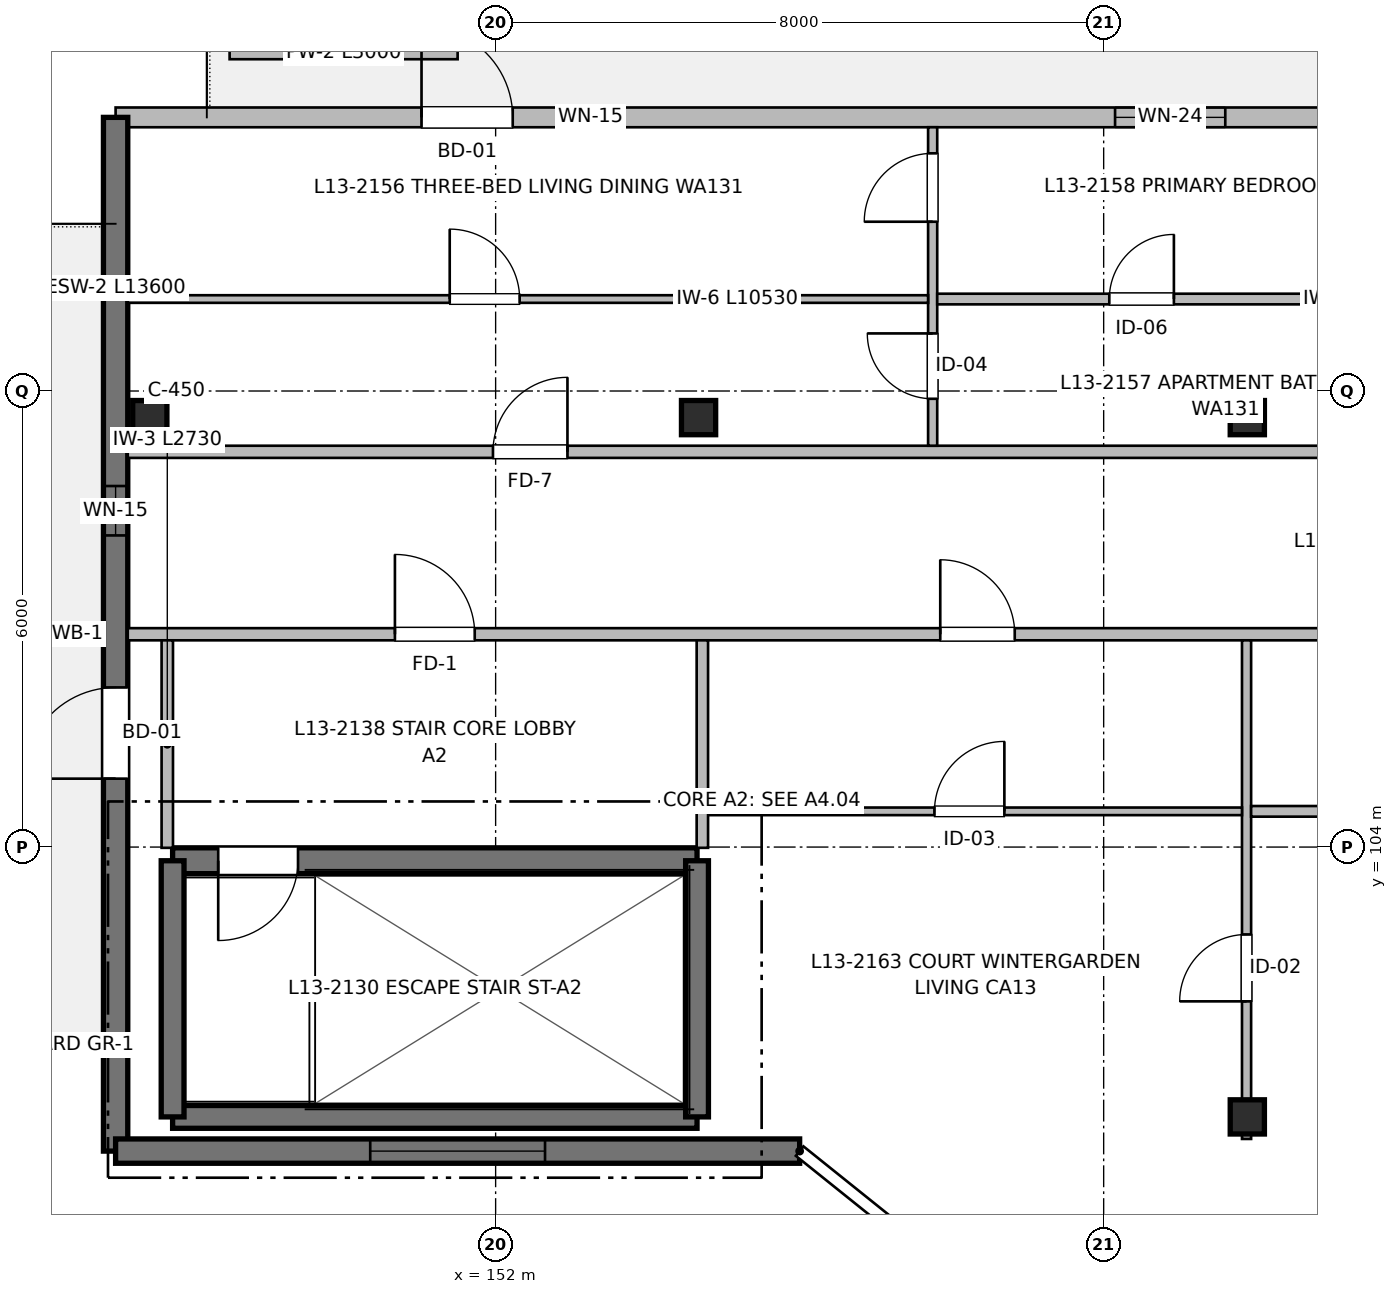
"""IFC4 building model, lengths in metres.
Left out: names, types, materials, properties, quantities, classifications, styles, units other than length and angle.
Written with IfcOpenShell. Run it as: python <this file> out.ifc"""

import sys

from ifc_helpers import new_model, si_unit, direction, frame, frame_2d, origin, origin_2d, place, context, subcontext, project, spatial, rectangle, extrude, element, fill, save


model = new_model("IFC4")
c1 = context("Model", 3, precision=1e-05, world=origin(), true_north=direction((0.0, 1.0)))
c2 = subcontext(c1, "Body", "Model", "MODEL_VIEW")
j1 = project(units=[si_unit("LENGTHUNIT", "METRE"), si_unit("PLANEANGLEUNIT", "RADIAN")], contexts=[c1])
p1 = place(None, origin())
s1 = spatial("IfcSite", under=j1, at=p1, CompositionType="ELEMENT")
p2 = place(p1, origin())
s2 = spatial("IfcBuilding", under=s1, at=p2, CompositionType="ELEMENT")
p3 = place(p2, frame((0.0, 0.0, 42.56)))
s3 = spatial("IfcBuildingStorey", under=s2, at=p3, CompositionType="ELEMENT", Elevation=42.56)
for number, where, z_axis, x_axis in (
    (1, (147.45, 109.65, 0.0), (0.0, 0.0, 1.0), (1.0, 0.0, 0.0)),
    (2, (154.67, 109.65, 0.0), (0.0, 0.0, 1.0), (1.0, 0.0, 0.0)),
    (3, (161.89, 100.45, 0.0), (0.0, 0.0, 1.0), (1.0, 0.0, 0.0)),
    (4, (161.89, 109.65, 0.0), (0.0, 0.0, 1.0), (1.0, 0.0, 0.0)),
):
    element("IfcColumn", number, at=place(p3, frame(where, z_axis=z_axis, x_axis=x_axis)), inside=s3, PredefinedType="COLUMN", context=c2, shape_type="SweptSolid", body=[
        extrude(rectangle(XDim=0.45, YDim=0.45, at=origin_2d()), origin(), (0.0, 0.0, 1.0), 3.2),
    ])
p4 = place(p3, frame((147.75, 100.45, 0.0), z_axis=(0.0, 0.0, 1.0), x_axis=(1.0, 0.0, 0.0)))
e5 = element("IfcWall", 5, at=p4, inside=s3, PredefinedType="SHEAR", context=c2, shape_type="SweptSolid", body=[
    extrude(rectangle(XDim=6.9, YDim=0.3, at=frame_2d((3.45, 0.0))), origin(), (0.0, 0.0, 1.0), 3.2),
])
p5 = place(p3, frame((154.65, 103.82, 0.0), z_axis=(0.0, 0.0, 1.0), x_axis=(-1.0, 0.0, 0.0)))
e6 = element("IfcWall", 6, at=p5, inside=s3, PredefinedType="SHEAR", context=c2, shape_type="SweptSolid", body=[
    extrude(rectangle(XDim=6.9, YDim=0.34, at=frame_2d((3.45, 0.0))), origin(), (0.0, 0.0, 1.0), 3.2),
])
p6 = place(p5, frame((5.25, 0.0, 0.0)))
e7 = element("IfcOpeningElement", 7, at=p6, cuts=e6, PredefinedType="OPENING", context=c2, shape_type="SweptSolid", body=[
    extrude(rectangle(XDim=1.05, YDim=2.15, at=frame_2d((0.525, 1.075))), frame((0.0, 0.18, 0.0), z_axis=(0.0, -1.0, 0.0), x_axis=(1.0, 0.0, 0.0)), (0.0, 0.0, 1.0), 0.36),
])
for number, where, z_axis, x_axis in (
    (8, (147.75, 103.82, 0.0), (0.0, 0.0, 1.0), (0.0, -1.0, 0.0)),
    (9, (154.65, 100.45, 0.0), (0.0, 0.0, 1.0), (0.0, 1.0, 0.0)),
):
    element("IfcWall", number, at=place(p3, frame(where, z_axis=z_axis, x_axis=x_axis)), inside=s3, PredefinedType="SHEAR", context=c2, shape_type="SweptSolid", body=[
        extrude(rectangle(XDim=3.37, YDim=0.3, at=frame_2d((1.685, 0.0))), origin(), (0.0, 0.0, 1.0), 3.2),
    ])
p7 = place(p3, frame((147.0, 113.6, 0.0), z_axis=(0.0, 0.0, 1.0), x_axis=(1.0, 0.0, 0.0)))
e10 = element("IfcWall", 10, at=p7, inside=s3, PredefinedType="SOLIDWALL", context=c2, shape_type="SweptSolid", body=[
    extrude(rectangle(XDim=37.0, YDim=0.26, at=frame_2d((18.5, 0.0))), origin(), (0.0, 0.0, 1.0), 2.98),
])
p8 = place(p7, frame((4.025, 0.0, 0.0)))
e11 = element("IfcOpeningElement", 11, at=p8, cuts=e10, PredefinedType="OPENING", context=c2, shape_type="SweptSolid", body=[
    extrude(rectangle(XDim=1.2, YDim=2.2, at=frame_2d((0.6, 1.1))), frame((0.0, 0.14, 0.0), z_axis=(0.0, -1.0, 0.0), x_axis=(1.0, 0.0, 0.0)), (0.0, 0.0, 1.0), 0.28),
])
p9 = place(p7, frame((5.925, 0.0, 0.9)))
e12 = element("IfcOpeningElement", 12, at=p9, cuts=e10, PredefinedType="OPENING", context=c2, shape_type="SweptSolid", body=[
    extrude(rectangle(XDim=0.65, YDim=0.95, at=frame_2d((0.325, 0.475))), frame((0.0, 0.14, 0.0), z_axis=(0.0, -1.0, 0.0), x_axis=(1.0, 0.0, 0.0)), (0.0, 0.0, 1.0), 0.28),
])
p10 = place(p7, frame((13.15, 0.0, 0.77)))
e13 = element("IfcOpeningElement", 13, at=p10, cuts=e10, PredefinedType="OPENING", context=c2, shape_type="SweptSolid", body=[
    extrude(rectangle(XDim=1.45, YDim=1.45, at=frame_2d((0.725, 0.725))), frame((0.0, 0.14, 0.0), z_axis=(0.0, -1.0, 0.0), x_axis=(1.0, 0.0, 0.0)), (0.0, 0.0, 1.0), 0.28),
])
p11 = place(p7, frame((22.525, 0.0, 0.0)))
e14 = element("IfcOpeningElement", 14, at=p11, cuts=e10, PredefinedType="OPENING", context=c2, shape_type="SweptSolid", body=[
    extrude(rectangle(XDim=1.2, YDim=2.2, at=frame_2d((0.6, 1.1))), frame((0.0, 0.14, 0.0), z_axis=(0.0, -1.0, 0.0), x_axis=(1.0, 0.0, 0.0)), (0.0, 0.0, 1.0), 0.28),
])
p12 = place(p7, frame((24.425, 0.0, 0.47)))
e15 = element("IfcOpeningElement", 15, at=p12, cuts=e10, PredefinedType="OPENING", context=c2, shape_type="SweptSolid", body=[
    extrude(rectangle(XDim=2.7, YDim=1.75, at=frame_2d((1.35, 0.875))), frame((0.0, 0.14, 0.0), z_axis=(0.0, -1.0, 0.0), x_axis=(1.0, 0.0, 0.0)), (0.0, 0.0, 1.0), 0.28),
])
p13 = place(p7, frame((31.075, 0.0, 0.67)))
e16 = element("IfcOpeningElement", 16, at=p13, cuts=e10, PredefinedType="OPENING", context=c2, shape_type="SweptSolid", body=[
    extrude(rectangle(XDim=2.6, YDim=1.55, at=frame_2d((1.3, 0.775))), frame((0.0, 0.14, 0.0), z_axis=(0.0, -1.0, 0.0), x_axis=(1.0, 0.0, 0.0)), (0.0, 0.0, 1.0), 0.28),
])
p14 = place(p3, frame((147.0, 100.0, 0.0), z_axis=(0.0, 0.0, 1.0), x_axis=(0.0, 1.0, 0.0)))
e17 = element("IfcWall", 17, at=p14, inside=s3, PredefinedType="SHEAR", context=c2, shape_type="SweptSolid", body=[
    extrude(rectangle(XDim=13.6, YDim=0.32, at=frame_2d((6.8, 0.0))), origin(), (0.0, 0.0, 1.0), 2.98),
])
p15 = place(p14, frame((4.9, 0.0, 0.0)))
e18 = element("IfcOpeningElement", 18, at=p15, cuts=e17, PredefinedType="OPENING", context=c2, shape_type="SweptSolid", body=[
    extrude(rectangle(XDim=1.2, YDim=2.2, at=frame_2d((0.6, 1.1))), frame((0.0, 0.17, 0.0), z_axis=(0.0, -1.0, 0.0), x_axis=(1.0, 0.0, 0.0)), (0.0, 0.0, 1.0), 0.34),
])
p16 = place(p14, frame((8.1, 0.0, 0.9)))
e19 = element("IfcOpeningElement", 19, at=p16, cuts=e17, PredefinedType="OPENING", context=c2, shape_type="SweptSolid", body=[
    extrude(rectangle(XDim=0.65, YDim=0.95, at=frame_2d((0.325, 0.475))), frame((0.0, 0.17, 0.0), z_axis=(0.0, -1.0, 0.0), x_axis=(1.0, 0.0, 0.0)), (0.0, 0.0, 1.0), 0.34),
])
p17 = place(p3, frame((156.0, 100.0, 0.0), z_axis=(0.0, 0.0, 1.0), x_axis=(-1.0, 0.0, 0.0)))
e20 = element("IfcWall", 20, at=p17, inside=s3, PredefinedType="SHEAR", context=c2, shape_type="SweptSolid", body=[
    extrude(rectangle(XDim=9.0, YDim=0.32, at=frame_2d((4.5, 0.0))), origin(), (0.0, 0.0, 1.0), 2.98),
])
p18 = place(p17, frame((3.35, 0.0, 0.57)))
e21 = element("IfcOpeningElement", 21, at=p18, cuts=e20, PredefinedType="OPENING", context=c2, shape_type="SweptSolid", body=[
    extrude(rectangle(XDim=2.3, YDim=1.65, at=frame_2d((1.15, 0.825))), frame((0.0, 0.17, 0.0), z_axis=(0.0, -1.0, 0.0), x_axis=(1.0, 0.0, 0.0)), (0.0, 0.0, 1.0), 0.34),
])
p19 = place(p3, frame((148.5, 114.45, 0.0), z_axis=(0.0, 0.0, 1.0), x_axis=(1.0, 0.0, 0.0)))
e22 = element("IfcWall", 22, at=p19, inside=s3, PredefinedType="PARAPET", context=c2, shape_type="SweptSolid", body=[
    extrude(rectangle(XDim=3.0, YDim=0.17, at=frame_2d((1.5, 0.0))), origin(), (0.0, 0.0, 1.0), 0.45),
])
p20 = place(p3, frame((147.16, 106.8, 0.0), z_axis=(0.0, 0.0, 1.0), x_axis=(1.0, 0.0, 0.0)))
e23 = element("IfcWall", 23, at=p20, inside=s3, PredefinedType="PARTITIONING", context=c2, shape_type="SweptSolid", body=[
    extrude(rectangle(XDim=27.64, YDim=0.16, at=frame_2d((13.82, 0.0))), origin(), (0.0, 0.0, 1.0), 2.935),
])
p21 = place(p20, frame((3.515, 0.0, 0.0)))
e24 = element("IfcOpeningElement", 24, at=p21, cuts=e23, PredefinedType="OPENING", context=c2, shape_type="SweptSolid", body=[
    extrude(rectangle(XDim=1.05, YDim=2.15, at=frame_2d((0.525, 1.075))), frame((0.0, 0.09, 0.0), z_axis=(0.0, -1.0, 0.0), x_axis=(1.0, 0.0, 0.0)), (0.0, 0.0, 1.0), 0.18),
])
p22 = place(p20, frame((10.69, 0.0, 0.0)))
e25 = element("IfcOpeningElement", 25, at=p22, cuts=e23, PredefinedType="OPENING", context=c2, shape_type="SweptSolid", body=[
    extrude(rectangle(XDim=0.98, YDim=2.15, at=frame_2d((0.49, 1.075))), frame((0.0, 0.09, 0.0), z_axis=(0.0, -1.0, 0.0), x_axis=(1.0, 0.0, 0.0)), (0.0, 0.0, 1.0), 0.18),
])
p23 = place(p3, frame((147.16, 109.2, 0.0), z_axis=(0.0, 0.0, 1.0), x_axis=(1.0, 0.0, 0.0)))
e26 = element("IfcWall", 26, at=p23, inside=s3, PredefinedType="PARTITIONING", context=c2, shape_type="SweptSolid", body=[
    extrude(rectangle(XDim=36.68, YDim=0.16, at=frame_2d((18.34, 0.0))), origin(), (0.0, 0.0, 1.0), 2.935),
])
p24 = place(p23, frame((4.805, 0.0, 0.0)))
e27 = element("IfcOpeningElement", 27, at=p24, cuts=e26, PredefinedType="OPENING", context=c2, shape_type="SweptSolid", body=[
    extrude(rectangle(XDim=0.98, YDim=2.15, at=frame_2d((0.49, 1.075))), frame((0.0, 0.09, 0.0), z_axis=(0.0, -1.0, 0.0), x_axis=(1.0, 0.0, 0.0)), (0.0, 0.0, 1.0), 0.18),
])
p25 = place(p23, frame((23.235, 0.0, 0.0)))
e28 = element("IfcOpeningElement", 28, at=p25, cuts=e26, PredefinedType="OPENING", context=c2, shape_type="SweptSolid", body=[
    extrude(rectangle(XDim=0.98, YDim=2.15, at=frame_2d((0.49, 1.075))), frame((0.0, 0.09, 0.0), z_axis=(0.0, -1.0, 0.0), x_axis=(1.0, 0.0, 0.0)), (0.0, 0.0, 1.0), 0.18),
])
for number, where, z_axis, x_axis in (
    (29, (147.68, 103.99, 0.0), (0.0, 0.0, 1.0), (0.0, 1.0, 0.0)),
    (30, (154.72, 103.99, 0.0), (0.0, 0.0, 1.0), (0.0, 1.0, 0.0)),
):
    element("IfcWall", number, at=place(p3, frame(where, z_axis=z_axis, x_axis=x_axis)), inside=s3, PredefinedType="PARTITIONING", context=c2, shape_type="SweptSolid", body=[
        extrude(rectangle(XDim=2.73, YDim=0.15, at=frame_2d((1.365, 0.0))), origin(), (0.0, 0.0, 1.0), 2.935),
    ])
p26 = place(p3, frame((157.75, 109.28, 0.0), z_axis=(0.0, 0.0, 1.0), x_axis=(0.0, 1.0, 0.0)))
e31 = element("IfcWall", 31, at=p26, inside=s3, PredefinedType="PARTITIONING", context=c2, shape_type="SweptSolid", body=[
    extrude(rectangle(XDim=4.19, YDim=0.12, at=frame_2d((2.095, 0.0))), origin(), (0.0, 0.0, 1.0), 2.935),
])
p27 = place(p26, frame((0.618, 0.0, 0.0)))
e32 = element("IfcOpeningElement", 32, at=p27, cuts=e31, PredefinedType="OPENING", context=c2, shape_type="SweptSolid", body=[
    extrude(rectangle(XDim=0.86, YDim=2.1, at=frame_2d((0.43, 1.05))), frame((0.0, 0.07, 0.0), z_axis=(0.0, -1.0, 0.0), x_axis=(1.0, 0.0, 0.0)), (0.0, 0.0, 1.0), 0.14),
])
p28 = place(p26, frame((2.947, 0.0, 0.0)))
e33 = element("IfcOpeningElement", 33, at=p28, cuts=e31, PredefinedType="OPENING", context=c2, shape_type="SweptSolid", body=[
    extrude(rectangle(XDim=0.9, YDim=2.1, at=frame_2d((0.45, 1.05))), frame((0.0, 0.07, 0.0), z_axis=(0.0, -1.0, 0.0), x_axis=(1.0, 0.0, 0.0)), (0.0, 0.0, 1.0), 0.14),
])
p29 = place(p3, frame((157.81, 111.21, 0.0), z_axis=(0.0, 0.0, 1.0), x_axis=(1.0, 0.0, 0.0)))
e34 = element("IfcWall", 34, at=p29, inside=s3, PredefinedType="PARTITIONING", context=c2, shape_type="SweptSolid", body=[
    extrude(rectangle(XDim=7.6, YDim=0.14, at=frame_2d((3.8, 0.0))), origin(), (0.0, 0.0, 1.0), 2.935),
])
p30 = place(p29, frame((2.264, 0.0, 0.0)))
e35 = element("IfcOpeningElement", 35, at=p30, cuts=e34, PredefinedType="OPENING", context=c2, shape_type="SweptSolid", body=[
    extrude(rectangle(XDim=0.85, YDim=2.05, at=frame_2d((0.425, 1.025))), frame((0.0, 0.08, 0.0), z_axis=(0.0, -1.0, 0.0), x_axis=(1.0, 0.0, 0.0)), (0.0, 0.0, 1.0), 0.16),
])
p31 = place(p3, frame((147.16, 111.21, 0.0), z_axis=(0.0, 0.0, 1.0), x_axis=(1.0, 0.0, 0.0)))
e36 = element("IfcWall", 36, at=p31, inside=s3, PredefinedType="PARTITIONING", context=c2, shape_type="SweptSolid", body=[
    extrude(rectangle(XDim=10.53, YDim=0.1, at=frame_2d((5.265, 0.0))), origin(), (0.0, 0.0, 1.0), 2.935),
])
p32 = place(p31, frame((4.236, 0.0, 0.0)))
e37 = element("IfcOpeningElement", 37, at=p32, cuts=e36, PredefinedType="OPENING", context=c2, shape_type="SweptSolid", body=[
    extrude(rectangle(XDim=0.92, YDim=2.1, at=frame_2d((0.46, 1.05))), frame((0.0, 0.06, 0.0), z_axis=(0.0, -1.0, 0.0), x_axis=(1.0, 0.0, 0.0)), (0.0, 0.0, 1.0), 0.12),
])
p33 = place(p3, frame((161.88, 100.16, 0.0), z_axis=(0.0, 0.0, 1.0), x_axis=(0.0, 1.0, 0.0)))
e38 = element("IfcWall", 38, at=p33, inside=s3, PredefinedType="PARTITIONING", context=c2, shape_type="SweptSolid", body=[
    extrude(rectangle(XDim=6.56, YDim=0.12, at=frame_2d((3.28, 0.0))), origin(), (0.0, 0.0, 1.0), 2.68),
])
p34 = place(p33, frame((1.81, 0.0, 0.0)))
e39 = element("IfcOpeningElement", 39, at=p34, cuts=e38, PredefinedType="OPENING", context=c2, shape_type="SweptSolid", body=[
    extrude(rectangle(XDim=0.88, YDim=2.1, at=frame_2d((0.44, 1.05))), frame((0.0, 0.07, 0.0), z_axis=(0.0, -1.0, 0.0), x_axis=(1.0, 0.0, 0.0)), (0.0, 0.0, 1.0), 0.14),
])
p35 = place(p3, frame((161.94, 104.47, 0.0), z_axis=(0.0, 0.0, 1.0), x_axis=(1.0, 0.0, 0.0)))
e40 = element("IfcWall", 40, at=p35, inside=s3, PredefinedType="PARTITIONING", context=c2, shape_type="SweptSolid", body=[
    extrude(rectangle(XDim=5.97, YDim=0.14, at=frame_2d((2.985, 0.0))), origin(), (0.0, 0.0, 1.0), 2.935),
])
p36 = place(p35, frame((2.533, 0.0, 0.0)))
e41 = element("IfcOpeningElement", 41, at=p36, cuts=e40, PredefinedType="OPENING", context=c2, shape_type="SweptSolid", body=[
    extrude(rectangle(XDim=0.86, YDim=2.1, at=frame_2d((0.43, 1.05))), frame((0.0, 0.08, 0.0), z_axis=(0.0, -1.0, 0.0), x_axis=(1.0, 0.0, 0.0)), (0.0, 0.0, 1.0), 0.16),
])
p37 = place(p3, frame((154.8, 104.47, 0.0), z_axis=(0.0, 0.0, 1.0), x_axis=(1.0, 0.0, 0.0)))
e42 = element("IfcWall", 42, at=p37, inside=s3, PredefinedType="PARTITIONING", context=c2, shape_type="SweptSolid", body=[
    extrude(rectangle(XDim=7.02, YDim=0.1, at=frame_2d((3.51, 0.0))), origin(), (0.0, 0.0, 1.0), 2.935),
])
p38 = place(p37, frame((2.974, 0.0, 0.0)))
e43 = element("IfcOpeningElement", 43, at=p38, cuts=e42, PredefinedType="OPENING", context=c2, shape_type="SweptSolid", body=[
    extrude(rectangle(XDim=0.92, YDim=2.1, at=frame_2d((0.46, 1.05))), frame((0.0, 0.06, 0.0), z_axis=(0.0, -1.0, 0.0), x_axis=(1.0, 0.0, 0.0)), (0.0, 0.0, 1.0), 0.12),
])
p39 = place(p6, origin())
e44 = element("IfcDoor", 44, at=p39, inside=s3, OperationType="SINGLE_SWING_RIGHT", PredefinedType="DOOR", context=c2, shape_type="SweptSolid", body=[
    extrude(rectangle(XDim=1.05, YDim=2.15, at=frame_2d((0.525, 1.075))), frame((0.0, 0.025, 0.0), z_axis=(0.0, -1.0, 0.0), x_axis=(1.0, 0.0, 0.0)), (0.0, 0.0, 1.0), 0.05),
])
fill(e7, e44)
p40 = place(p8, origin())
e45 = element("IfcDoor", 45, at=p40, inside=s3, OperationType="SINGLE_SWING_LEFT", PredefinedType="DOOR", context=c2, shape_type="SweptSolid", body=[
    extrude(rectangle(XDim=1.2, YDim=2.2, at=frame_2d((0.6, 1.1))), frame((0.0, 0.025, 0.0), z_axis=(0.0, -1.0, 0.0), x_axis=(1.0, 0.0, 0.0)), (0.0, 0.0, 1.0), 0.05),
])
fill(e11, e45)
p41 = place(p9, origin())
e46 = element("IfcWindow", 46, at=p41, inside=s3, PartitioningType="SINGLE_PANEL", PredefinedType="WINDOW", context=c2, shape_type="SweptSolid", body=[
    extrude(rectangle(XDim=0.65, YDim=0.95, at=frame_2d((0.325, 0.475))), frame((0.0, 0.03, 0.0), z_axis=(0.0, -1.0, 0.0), x_axis=(1.0, 0.0, 0.0)), (0.0, 0.0, 1.0), 0.06),
])
fill(e12, e46)
p42 = place(p10, origin())
e47 = element("IfcWindow", 47, at=p42, inside=s3, PartitioningType="SINGLE_PANEL", PredefinedType="WINDOW", context=c2, shape_type="SweptSolid", body=[
    extrude(rectangle(XDim=1.45, YDim=1.45, at=frame_2d((0.725, 0.725))), frame((0.0, 0.03, 0.0), z_axis=(0.0, -1.0, 0.0), x_axis=(1.0, 0.0, 0.0)), (0.0, 0.0, 1.0), 0.06),
])
fill(e13, e47)
p43 = place(p15, origin())
e48 = element("IfcDoor", 48, at=p43, inside=s3, OperationType="SINGLE_SWING_LEFT", PredefinedType="DOOR", context=c2, shape_type="SweptSolid", body=[
    extrude(rectangle(XDim=1.2, YDim=2.2, at=frame_2d((0.6, 1.1))), frame((0.0, 0.025, 0.0), z_axis=(0.0, -1.0, 0.0), x_axis=(1.0, 0.0, 0.0)), (0.0, 0.0, 1.0), 0.05),
])
fill(e18, e48)
p44 = place(p16, origin())
e49 = element("IfcWindow", 49, at=p44, inside=s3, PartitioningType="SINGLE_PANEL", PredefinedType="WINDOW", context=c2, shape_type="SweptSolid", body=[
    extrude(rectangle(XDim=0.65, YDim=0.95, at=frame_2d((0.325, 0.475))), frame((0.0, 0.03, 0.0), z_axis=(0.0, -1.0, 0.0), x_axis=(1.0, 0.0, 0.0)), (0.0, 0.0, 1.0), 0.06),
])
fill(e19, e49)
p45 = place(p18, origin())
e50 = element("IfcWindow", 50, at=p45, inside=s3, PartitioningType="SINGLE_PANEL", PredefinedType="WINDOW", context=c2, shape_type="SweptSolid", body=[
    extrude(rectangle(XDim=2.3, YDim=1.65, at=frame_2d((1.15, 0.825))), frame((0.0, 0.03, 0.0), z_axis=(0.0, -1.0, 0.0), x_axis=(1.0, 0.0, 0.0)), (0.0, 0.0, 1.0), 0.06),
])
fill(e21, e50)
p46 = place(p21, origin())
e51 = element("IfcDoor", 51, at=p46, inside=s3, OperationType="SINGLE_SWING_LEFT", PredefinedType="DOOR", context=c2, shape_type="SweptSolid", body=[
    extrude(rectangle(XDim=1.05, YDim=2.15, at=frame_2d((0.525, 1.075))), frame((0.0, 0.025, 0.0), z_axis=(0.0, -1.0, 0.0), x_axis=(1.0, 0.0, 0.0)), (0.0, 0.0, 1.0), 0.05),
])
fill(e24, e51)
p47 = place(p24, origin())
e52 = element("IfcDoor", 52, at=p47, inside=s3, OperationType="SINGLE_SWING_RIGHT", PredefinedType="DOOR", context=c2, shape_type="SweptSolid", body=[
    extrude(rectangle(XDim=0.98, YDim=2.15, at=frame_2d((0.49, 1.075))), frame((0.0, 0.025, 0.0), z_axis=(0.0, -1.0, 0.0), x_axis=(1.0, 0.0, 0.0)), (0.0, 0.0, 1.0), 0.05),
])
fill(e27, e52)
p48 = place(p32, origin())
e53 = element("IfcDoor", 53, at=p48, inside=s3, OperationType="SINGLE_SWING_LEFT", PredefinedType="DOOR", context=c2, shape_type="SweptSolid", body=[
    extrude(rectangle(XDim=0.92, YDim=2.1, at=frame_2d((0.46, 1.05))), frame((0.0, 0.025, 0.0), z_axis=(0.0, -1.0, 0.0), x_axis=(1.0, 0.0, 0.0)), (0.0, 0.0, 1.0), 0.05),
])
fill(e37, e53)
p49 = place(p27, origin())
e54 = element("IfcDoor", 54, at=p49, inside=s3, OperationType="SINGLE_SWING_RIGHT", PredefinedType="DOOR", context=c2, shape_type="SweptSolid", body=[
    extrude(rectangle(XDim=0.86, YDim=2.1, at=frame_2d((0.43, 1.05))), frame((0.0, 0.025, 0.0), z_axis=(0.0, -1.0, 0.0), x_axis=(1.0, 0.0, 0.0)), (0.0, 0.0, 1.0), 0.05),
])
fill(e32, e54)
p50 = place(p28, origin())
e55 = element("IfcDoor", 55, at=p50, inside=s3, OperationType="SINGLE_SWING_LEFT", PredefinedType="DOOR", context=c2, shape_type="SweptSolid", body=[
    extrude(rectangle(XDim=0.9, YDim=2.1, at=frame_2d((0.45, 1.05))), frame((0.0, 0.025, 0.0), z_axis=(0.0, -1.0, 0.0), x_axis=(1.0, 0.0, 0.0)), (0.0, 0.0, 1.0), 0.05),
])
fill(e33, e55)
p51 = place(p30, origin())
e56 = element("IfcDoor", 56, at=p51, inside=s3, OperationType="SINGLE_SWING_RIGHT", PredefinedType="DOOR", context=c2, shape_type="SweptSolid", body=[
    extrude(rectangle(XDim=0.85, YDim=2.05, at=frame_2d((0.425, 1.025))), frame((0.0, 0.025, 0.0), z_axis=(0.0, -1.0, 0.0), x_axis=(1.0, 0.0, 0.0)), (0.0, 0.0, 1.0), 0.05),
])
fill(e35, e56)
p52 = place(p22, origin())
e57 = element("IfcDoor", 57, at=p52, inside=s3, OperationType="SINGLE_SWING_LEFT", PredefinedType="DOOR", context=c2, shape_type="SweptSolid", body=[
    extrude(rectangle(XDim=0.98, YDim=2.15, at=frame_2d((0.49, 1.075))), frame((0.0, 0.025, 0.0), z_axis=(0.0, -1.0, 0.0), x_axis=(1.0, 0.0, 0.0)), (0.0, 0.0, 1.0), 0.05),
])
fill(e25, e57)
p53 = place(p38, origin())
e58 = element("IfcDoor", 58, at=p53, inside=s3, OperationType="SINGLE_SWING_RIGHT", PredefinedType="DOOR", context=c2, shape_type="SweptSolid", body=[
    extrude(rectangle(XDim=0.92, YDim=2.1, at=frame_2d((0.46, 1.05))), frame((0.0, 0.025, 0.0), z_axis=(0.0, -1.0, 0.0), x_axis=(1.0, 0.0, 0.0)), (0.0, 0.0, 1.0), 0.05),
])
fill(e43, e58)
p54 = place(p34, origin())
e59 = element("IfcDoor", 59, at=p54, inside=s3, OperationType="SINGLE_SWING_LEFT", PredefinedType="DOOR", context=c2, shape_type="SweptSolid", body=[
    extrude(rectangle(XDim=0.88, YDim=2.1, at=frame_2d((0.44, 1.05))), frame((0.0, 0.025, 0.0), z_axis=(0.0, -1.0, 0.0), x_axis=(1.0, 0.0, 0.0)), (0.0, 0.0, 1.0), 0.05),
])
fill(e39, e59)
save(model, sys.argv[1])
